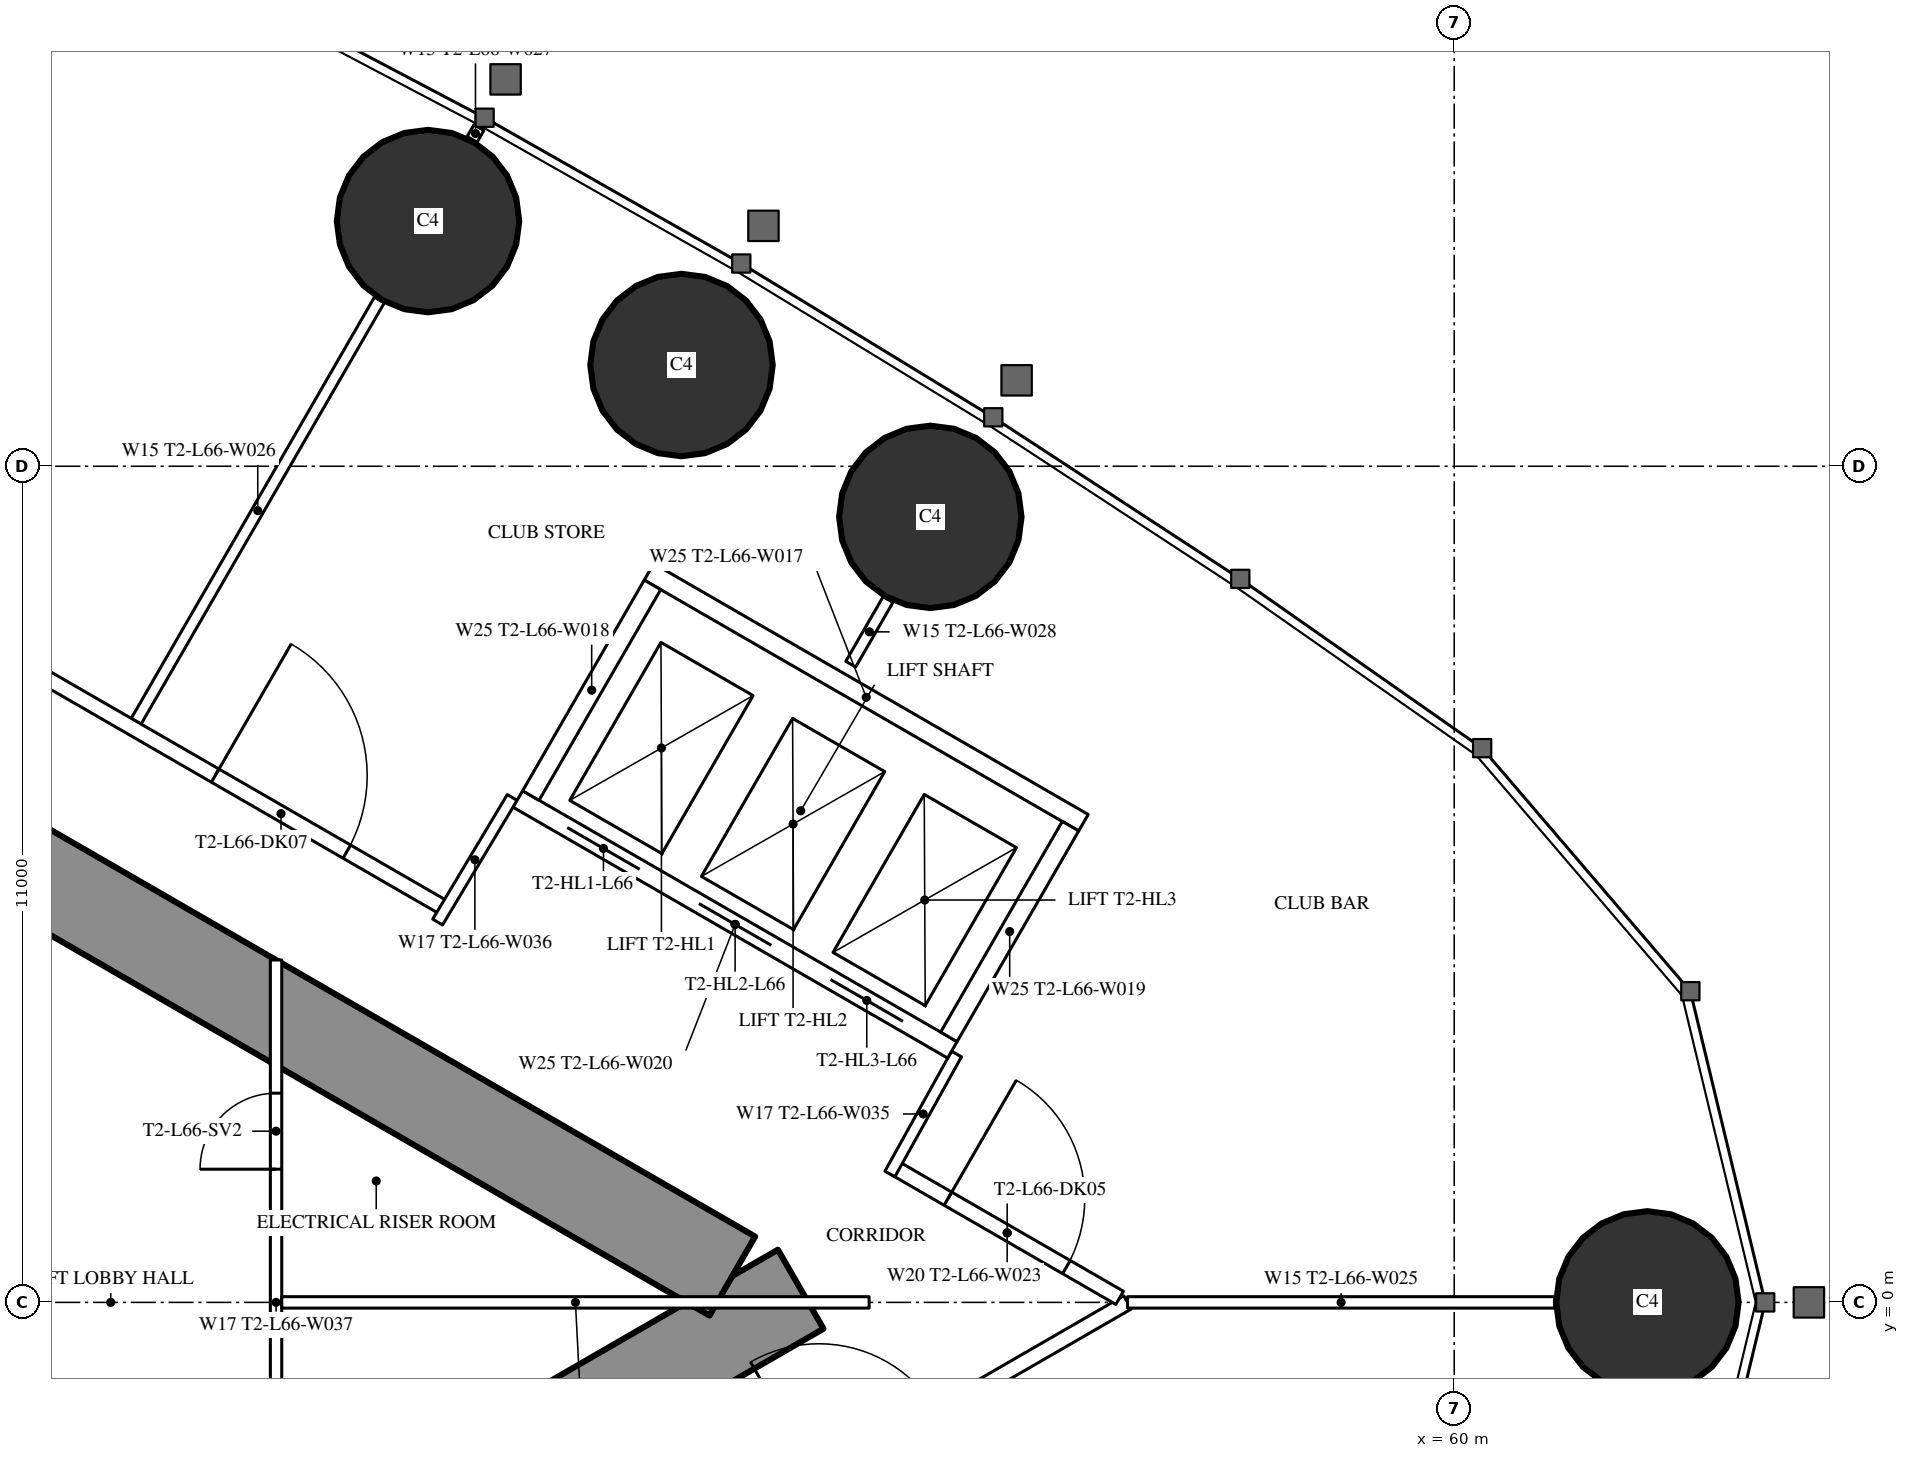
"""IFC4 building model, lengths in metres.
Left out: names, types, materials, properties, quantities, classifications, styles, units other than length and angle.
Written with IfcOpenShell. Run it as: python <this file> out.ifc"""

import sys

from ifc_helpers import new_model, si_unit, direction, frame, frame_2d, origin, origin_2d, place, context, subcontext, project, spatial, rectangle, circle, extrude, element, fill, save


model = new_model("IFC4")
c1 = context("Model", 3, precision=1e-05, world=origin(), true_north=direction((0.0, 1.0)))
c2 = subcontext(c1, "Body", "Model", "MODEL_VIEW")
j1 = project(units=[si_unit("LENGTHUNIT", "METRE"), si_unit("PLANEANGLEUNIT", "RADIAN")], contexts=[c1])
p1 = place(None, origin())
s1 = spatial("IfcSite", under=j1, at=p1, CompositionType="ELEMENT")
p2 = place(p1, origin())
s2 = spatial("IfcBuilding", under=s1, at=p2, CompositionType="ELEMENT")
p3 = place(p2, frame((0.0, 0.0, 247.7)))
s3 = spatial("IfcBuildingStorey", under=s2, at=p3, CompositionType="ELEMENT", Elevation=247.7)
for number, where, z_axis, x_axis in (
    (1, (62.542, 0.0, 0.0), (0.0, 0.0, 1.0), (1.0, 0.0, 0.0)),
    (2, (53.108, 10.334, 0.0), (0.0, 0.0, 1.0), (1.0, 0.0, 0.0)),
    (3, (49.834, 12.332, 0.0), (0.0, 0.0, 1.0), (1.0, 0.0, 0.0)),
    (4, (46.499, 14.226, 0.0), (0.0, 0.0, 1.0), (1.0, 0.0, 0.0)),
):
    element("IfcColumn", number, at=place(p3, frame(where, z_axis=z_axis, x_axis=x_axis)), inside=s3, PredefinedType="COLUMN", context=c2, shape_type="SweptSolid", body=[
        extrude(circle(Radius=1.2, at=origin_2d()), origin(), (0.0, 0.0, 1.0), 4.2),
    ])
p4 = place(p3, frame((27.2, -13.8, 0.0), z_axis=(0.0, 0.0, 1.0), x_axis=(0.866027159892, 0.499996958321, 0.0)))
e5 = element("IfcWall", 5, at=p4, inside=s3, PredefinedType="SHEAR", context=c2, shape_type="SweptSolid", body=[
    extrude(rectangle(XDim=27.947, YDim=1.2, at=frame_2d((13.973, 0.0))), origin(), (0.0, 0.0, 1.0), 4.2),
])
p5 = place(p4, frame((4.6, 0.0, 0.0)))
e6 = element("IfcOpeningElement", 6, at=p5, cuts=e5, PredefinedType="OPENING", context=c2, shape_type="SweptSolid", body=[
    extrude(rectangle(XDim=1.0, YDim=2.2, at=frame_2d((0.5, 1.1))), frame((0.0, 0.61, 0.0), z_axis=(0.0, -1.0, 0.0), x_axis=(1.0, 0.0, 0.0)), (0.0, 0.0, 1.0), 1.22),
])
p6 = place(p4, frame((13.395, 0.0, 0.0)))
e7 = element("IfcOpeningElement", 7, at=p6, cuts=e5, PredefinedType="OPENING", context=c2, shape_type="SweptSolid", body=[
    extrude(rectangle(XDim=1.8, YDim=2.2, at=frame_2d((0.9, 1.1))), frame((0.0, 0.61, 0.0), z_axis=(0.0, -1.0, 0.0), x_axis=(1.0, 0.0, 0.0)), (0.0, 0.0, 1.0), 1.22),
])
p7 = place(p3, frame((27.2, 13.8, 0.0), z_axis=(0.0, 0.0, 1.0), x_axis=(0.866024515034, -0.500001539357, 0.0)))
e8 = element("IfcWall", 8, at=p7, inside=s3, PredefinedType="SHEAR", context=c2, shape_type="SweptSolid", body=[
    extrude(rectangle(XDim=26.907, YDim=1.2, at=frame_2d((13.454, 0.0))), origin(), (0.0, 0.0, 1.0), 4.2),
])
p8 = place(p7, frame((4.6, 0.0, 0.0)))
e9 = element("IfcOpeningElement", 9, at=p8, cuts=e8, PredefinedType="OPENING", context=c2, shape_type="SweptSolid", body=[
    extrude(rectangle(XDim=1.0, YDim=2.2, at=frame_2d((0.5, 1.1))), frame((0.0, 0.61, 0.0), z_axis=(0.0, -1.0, 0.0), x_axis=(1.0, 0.0, 0.0)), (0.0, 0.0, 1.0), 1.22),
])
p9 = place(p7, frame((13.395, 0.0, 0.0)))
e10 = element("IfcOpeningElement", 10, at=p9, cuts=e8, PredefinedType="OPENING", context=c2, shape_type="SweptSolid", body=[
    extrude(rectangle(XDim=1.8, YDim=2.2, at=frame_2d((0.9, 1.1))), frame((0.0, 0.61, 0.0), z_axis=(0.0, -1.0, 0.0), x_axis=(1.0, 0.0, 0.0)), (0.0, 0.0, 1.0), 1.22),
])
p10 = place(p3, frame((28.907, -15.47, 0.0), z_axis=(0.0, 0.0, 1.0), x_axis=(0.866023700353, 0.500002950419, 0.0)))
e11 = element("IfcWall", 11, at=p10, inside=s3, PredefinedType="PARTITIONING", context=c2, shape_type="SweptSolid", body=[
    extrude(rectangle(XDim=30.941, YDim=0.2, at=frame_2d((15.47, 0.0))), origin(), (0.0, 0.0, 1.0), 3.95),
])
p11 = place(p10, frame((7.124, 0.0, 0.0)))
e12 = element("IfcOpeningElement", 12, at=p11, cuts=e11, PredefinedType="OPENING", context=c2, shape_type="SweptSolid", body=[
    extrude(rectangle(XDim=1.8, YDim=2.2, at=frame_2d((0.9, 1.1))), frame((0.0, 0.11, 0.0), z_axis=(0.0, -1.0, 0.0), x_axis=(1.0, 0.0, 0.0)), (0.0, 0.0, 1.0), 0.22),
])
p12 = place(p10, frame((16.865, 0.0, 0.0)))
e13 = element("IfcOpeningElement", 13, at=p12, cuts=e11, PredefinedType="OPENING", context=c2, shape_type="SweptSolid", body=[
    extrude(rectangle(XDim=1.8, YDim=2.2, at=frame_2d((0.9, 1.1))), frame((0.0, 0.11, 0.0), z_axis=(0.0, -1.0, 0.0), x_axis=(1.0, 0.0, 0.0)), (0.0, 0.0, 1.0), 0.22),
])
p13 = place(p10, frame((20.748, 0.0, 0.0)))
e14 = element("IfcOpeningElement", 14, at=p13, cuts=e11, PredefinedType="OPENING", context=c2, shape_type="SweptSolid", body=[
    extrude(rectangle(XDim=1.8, YDim=2.2, at=frame_2d((0.9, 1.1))), frame((0.0, 0.11, 0.0), z_axis=(0.0, -1.0, 0.0), x_axis=(1.0, 0.0, 0.0)), (0.0, 0.0, 1.0), 0.22),
])
p14 = place(p10, frame((26.252, 0.0, 0.0)))
e15 = element("IfcOpeningElement", 15, at=p14, cuts=e11, PredefinedType="OPENING", context=c2, shape_type="SweptSolid", body=[
    extrude(rectangle(XDim=1.8, YDim=2.2, at=frame_2d((0.9, 1.1))), frame((0.0, 0.11, 0.0), z_axis=(0.0, -1.0, 0.0), x_axis=(1.0, 0.0, 0.0)), (0.0, 0.0, 1.0), 0.22),
])
p15 = place(p3, frame((42.66, 7.646, 0.0), z_axis=(0.0, 0.0, 1.0), x_axis=(0.499996592859, 0.866027370889, 0.0)))
e16 = element("IfcWall", 16, at=p15, inside=s3, PredefinedType="PARTITIONING", context=c2, shape_type="SweptSolid", body=[
    extrude(rectangle(XDim=6.398, YDim=0.15, at=frame_2d((3.199, 0.0))), origin(), (0.0, 0.0, 1.0), 3.05),
])
p16 = place(p3, frame((47.079, 15.3, 0.0), z_axis=(0.0, 0.0, 1.0), x_axis=(0.499212083968, 0.866479829667, 0.0)))
e17 = element("IfcWall", 17, at=p16, inside=s3, PredefinedType="PARTITIONING", context=c2, shape_type="SweptSolid", body=[
    extrude(rectangle(XDim=0.179, YDim=0.15, at=frame_2d((0.09, 0.0))), origin(), (0.0, 0.0, 1.0), 3.05),
])
p17 = place(p3, frame((55.702, 0.0, 0.0), z_axis=(0.0, 0.0, 1.0), x_axis=(1.0, 0.0, 0.0)))
e18 = element("IfcWall", 18, at=p17, inside=s3, PredefinedType="PARTITIONING", context=c2, shape_type="SweptSolid", body=[
    extrude(rectangle(XDim=5.619, YDim=0.15, at=frame_2d((2.81, 0.0))), origin(), (0.0, 0.0, 1.0), 3.05),
])
p18 = place(p3, frame((52.06, 8.396, 0.0), z_axis=(0.0, 0.0, 1.0), x_axis=(0.500095379624, 0.865970329329, 0.0)))
e19 = element("IfcWall", 19, at=p18, inside=s3, PredefinedType="PARTITIONING", context=c2, shape_type="SweptSolid", body=[
    extrude(rectangle(XDim=0.982, YDim=0.15, at=frame_2d((0.491, 0.0))), origin(), (0.0, 0.0, 1.0), 3.95),
])
p19 = place(p3, frame((28.907, 15.47, 0.0), z_axis=(0.0, 0.0, 1.0), x_axis=(0.866026627509, -0.499997880441, 0.0)))
e20 = element("IfcWall", 20, at=p19, inside=s3, PredefinedType="PARTITIONING", context=c2, shape_type="SweptSolid", body=[
    extrude(rectangle(XDim=20.563, YDim=0.2, at=frame_2d((10.282, 0.0))), origin(), (0.0, 0.0, 1.0), 3.95),
])
p20 = place(p19, frame((17.081, 0.0, 0.0)))
e21 = element("IfcOpeningElement", 21, at=p20, cuts=e20, PredefinedType="OPENING", context=c2, shape_type="SweptSolid", body=[
    extrude(rectangle(XDim=2.0, YDim=2.4, at=frame_2d((1.0, 1.2))), frame((0.0, 0.11, 0.0), z_axis=(0.0, -1.0, 0.0), x_axis=(1.0, 0.0, 0.0)), (0.0, 0.0, 1.0), 0.22),
])
p21 = place(p19, frame((7.124, 0.0, 0.0)))
e22 = element("IfcOpeningElement", 22, at=p21, cuts=e20, PredefinedType="OPENING", context=c2, shape_type="SweptSolid", body=[
    extrude(rectangle(XDim=1.8, YDim=2.2, at=frame_2d((0.9, 1.1))), frame((0.0, 0.11, 0.0), z_axis=(0.0, -1.0, 0.0), x_axis=(1.0, 0.0, 0.0)), (0.0, 0.0, 1.0), 0.22),
])
p22 = place(p3, frame((52.639, 1.769, 0.0), z_axis=(0.0, 0.0, 1.0), x_axis=(0.866027340901, -0.4999966448, 0.0)))
e23 = element("IfcWall", 23, at=p22, inside=s3, PredefinedType="PARTITIONING", context=c2, shape_type="SweptSolid", body=[
    extrude(rectangle(XDim=3.417, YDim=0.2, at=frame_2d((1.708, 0.0))), origin(), (0.0, 0.0, 1.0), 3.95),
])
p23 = place(p22, frame((0.809, 0.0, 0.0)))
e24 = element("IfcOpeningElement", 24, at=p23, cuts=e23, PredefinedType="OPENING", context=c2, shape_type="SweptSolid", body=[
    extrude(rectangle(XDim=1.8, YDim=2.2, at=frame_2d((0.9, 1.1))), frame((0.0, 0.11, 0.0), z_axis=(0.0, -1.0, 0.0), x_axis=(1.0, 0.0, 0.0)), (0.0, 0.0, 1.0), 0.22),
])
p24 = place(p3, frame((47.606, 6.642, 0.0), z_axis=(0.0, 0.0, 1.0), x_axis=(-0.51353662755, -0.858067673418, 0.0)))
e25 = element("IfcWall", 25, at=p24, inside=s3, PredefinedType="PARTITIONING", context=c2, shape_type="SweptSolid", body=[
    extrude(rectangle(XDim=1.91, YDim=0.15, at=frame_2d((0.955, 0.0))), origin(), (0.0, 0.0, 1.0), 3.95),
])
p25 = place(p3, frame((52.576, 1.689, 0.0), z_axis=(0.0, 0.0, 1.0), x_axis=(0.485482130951, 0.874246590229, 0.0)))
e26 = element("IfcWall", 26, at=p25, inside=s3, PredefinedType="PARTITIONING", context=c2, shape_type="SweptSolid", body=[
    extrude(rectangle(XDim=1.805, YDim=0.15, at=frame_2d((0.902, 0.0))), origin(), (0.0, 0.0, 1.0), 3.95),
])
p26 = place(p3, frame((44.5, -4.505, 0.0), z_axis=(0.0, 0.0, 1.0), x_axis=(0.0, 1.0, 0.0)))
e27 = element("IfcWall", 27, at=p26, inside=s3, PredefinedType="PARTITIONING", context=c2, shape_type="SweptSolid", body=[
    extrude(rectangle(XDim=9.009, YDim=0.15, at=frame_2d((4.505, 0.0))), origin(), (0.0, 0.0, 1.0), 3.95),
])
p27 = place(p26, frame((1.752, 0.0, 0.0)))
e28 = element("IfcOpeningElement", 28, at=p27, cuts=e27, PredefinedType="OPENING", context=c2, shape_type="SweptSolid", body=[
    extrude(rectangle(XDim=1.0, YDim=2.2, at=frame_2d((0.5, 1.1))), frame((0.0, 0.085, 0.0), z_axis=(0.0, -1.0, 0.0), x_axis=(1.0, 0.0, 0.0)), (0.0, 0.0, 1.0), 0.17),
])
p28 = place(p26, frame((6.257, 0.0, 0.0)))
e29 = element("IfcOpeningElement", 29, at=p28, cuts=e27, PredefinedType="OPENING", context=c2, shape_type="SweptSolid", body=[
    extrude(rectangle(XDim=1.0, YDim=2.2, at=frame_2d((0.5, 1.1))), frame((0.0, 0.085, 0.0), z_axis=(0.0, -1.0, 0.0), x_axis=(1.0, 0.0, 0.0)), (0.0, 0.0, 1.0), 0.17),
])
p29 = place(p3, frame((44.575, 0.0, 0.0), z_axis=(0.0, 0.0, 1.0), x_axis=(1.0, 0.0, 0.0)))
e30 = element("IfcWall", 30, at=p29, inside=s3, PredefinedType="PARTITIONING", context=c2, shape_type="SweptSolid", body=[
    extrude(rectangle(XDim=7.727, YDim=0.15, at=frame_2d((3.864, 0.0))), origin(), (0.0, 0.0, 1.0), 3.05),
])
p30 = place(p3, frame((47.681, 6.622, 0.0), z_axis=(0.0, 0.0, 1.0), x_axis=(0.86603344179, -0.499986077507, 0.0)))
e31 = element("IfcWall", 31, at=p30, inside=s3, PredefinedType="PARTITIONING", context=c2, shape_type="SweptSolid", body=[
    extrude(rectangle(XDim=6.6, YDim=0.25, at=frame_2d((3.3, 0.0))), origin(), (0.0, 0.0, 1.0), 3.95),
])
p31 = place(p30, frame((0.75, 0.0, 0.0)))
e32 = element("IfcOpeningElement", 32, at=p31, cuts=e31, PredefinedType="OPENING", context=c2, shape_type="SweptSolid", body=[
    extrude(rectangle(XDim=1.1, YDim=2.2, at=frame_2d((0.55, 1.1))), frame((0.0, 0.135, 0.0), z_axis=(0.0, -1.0, 0.0), x_axis=(1.0, 0.0, 0.0)), (0.0, 0.0, 1.0), 0.27),
])
p32 = place(p30, frame((2.75, 0.0, 0.0)))
e33 = element("IfcOpeningElement", 33, at=p32, cuts=e31, PredefinedType="OPENING", context=c2, shape_type="SweptSolid", body=[
    extrude(rectangle(XDim=1.1, YDim=2.2, at=frame_2d((0.55, 1.1))), frame((0.0, 0.135, 0.0), z_axis=(0.0, -1.0, 0.0), x_axis=(1.0, 0.0, 0.0)), (0.0, 0.0, 1.0), 0.27),
])
p33 = place(p30, frame((4.75, 0.0, 0.0)))
e34 = element("IfcOpeningElement", 34, at=p33, cuts=e31, PredefinedType="OPENING", context=c2, shape_type="SweptSolid", body=[
    extrude(rectangle(XDim=1.1, YDim=2.2, at=frame_2d((0.55, 1.1))), frame((0.0, 0.135, 0.0), z_axis=(0.0, -1.0, 0.0), x_axis=(1.0, 0.0, 0.0)), (0.0, 0.0, 1.0), 0.27),
])
p34 = place(p3, frame((49.406, 9.611, 0.0), z_axis=(0.0, 0.0, 1.0), x_axis=(0.86603344179, -0.499986077507, 0.0)))
e35 = element("IfcWall", 35, at=p34, inside=s3, PredefinedType="PARTITIONING", context=c2, shape_type="SweptSolid", body=[
    extrude(rectangle(XDim=6.6, YDim=0.25, at=frame_2d((3.3, 0.0))), origin(), (0.0, 0.0, 1.0), 3.95),
])
p35 = place(p3, frame((47.852, 6.668, 0.0), z_axis=(0.0, 0.0, 1.0), x_axis=(0.499929347863, 0.866066190972, 0.0)))
e36 = element("IfcWall", 36, at=p35, inside=s3, PredefinedType="PARTITIONING", context=c2, shape_type="SweptSolid", body=[
    extrude(rectangle(XDim=3.201, YDim=0.25, at=frame_2d((1.6, 0.0))), origin(), (0.0, 0.0, 1.0), 3.95),
])
p36 = place(p3, frame((53.352, 3.493, 0.0), z_axis=(0.0, 0.0, 1.0), x_axis=(0.499872130319, 0.866099216793, 0.0)))
e37 = element("IfcWall", 37, at=p36, inside=s3, PredefinedType="PARTITIONING", context=c2, shape_type="SweptSolid", body=[
    extrude(rectangle(XDim=3.2, YDim=0.25, at=frame_2d((1.6, 0.0))), origin(), (0.0, 0.0, 1.0), 3.95),
])
p37 = place(p20, origin())
e38 = element("IfcDoor", 38, at=p37, inside=s3, OperationType="DOUBLE_DOOR_SINGLE_SWING", PredefinedType="DOOR", context=c2, shape_type="SweptSolid", body=[
    extrude(rectangle(XDim=2.0, YDim=2.4, at=frame_2d((1.0, 1.2))), frame((0.0, 0.025, 0.0), z_axis=(0.0, -1.0, 0.0), x_axis=(1.0, 0.0, 0.0)), (0.0, 0.0, 1.0), 0.05),
])
fill(e21, e38)
p38 = place(p23, origin())
e39 = element("IfcDoor", 39, at=p38, inside=s3, OperationType="DOUBLE_DOOR_SINGLE_SWING", PredefinedType="DOOR", context=c2, shape_type="SweptSolid", body=[
    extrude(rectangle(XDim=1.8, YDim=2.2, at=frame_2d((0.9, 1.1))), frame((0.0, 0.025, 0.0), z_axis=(0.0, -1.0, 0.0), x_axis=(1.0, 0.0, 0.0)), (0.0, 0.0, 1.0), 0.05),
])
fill(e24, e39)
p39 = place(p28, origin())
e40 = element("IfcDoor", 40, at=p39, inside=s3, OperationType="SINGLE_SWING_LEFT", PredefinedType="DOOR", context=c2, shape_type="SweptSolid", body=[
    extrude(rectangle(XDim=1.0, YDim=2.2, at=frame_2d((0.5, 1.1))), frame((0.0, 0.025, 0.0), z_axis=(0.0, -1.0, 0.0), x_axis=(1.0, 0.0, 0.0)), (0.0, 0.0, 1.0), 0.05),
])
fill(e29, e40)
p40 = place(p31, origin())
e41 = element("IfcDoor", 41, at=p40, inside=s3, OperationType="DOUBLE_DOOR_SLIDING", PredefinedType="USERDEFINED", context=c2, shape_type="SweptSolid", body=[
    extrude(rectangle(XDim=1.1, YDim=2.2, at=frame_2d((0.55, 1.1))), frame((0.0, 0.025, 0.0), z_axis=(0.0, -1.0, 0.0), x_axis=(1.0, 0.0, 0.0)), (0.0, 0.0, 1.0), 0.05),
])
fill(e32, e41)
p41 = place(p32, origin())
e42 = element("IfcDoor", 42, at=p41, inside=s3, OperationType="DOUBLE_DOOR_SLIDING", PredefinedType="USERDEFINED", context=c2, shape_type="SweptSolid", body=[
    extrude(rectangle(XDim=1.1, YDim=2.2, at=frame_2d((0.55, 1.1))), frame((0.0, 0.025, 0.0), z_axis=(0.0, -1.0, 0.0), x_axis=(1.0, 0.0, 0.0)), (0.0, 0.0, 1.0), 0.05),
])
fill(e33, e42)
p42 = place(p33, origin())
e43 = element("IfcDoor", 43, at=p42, inside=s3, OperationType="DOUBLE_DOOR_SLIDING", PredefinedType="USERDEFINED", context=c2, shape_type="SweptSolid", body=[
    extrude(rectangle(XDim=1.1, YDim=2.2, at=frame_2d((0.55, 1.1))), frame((0.0, 0.025, 0.0), z_axis=(0.0, -1.0, 0.0), x_axis=(1.0, 0.0, 0.0)), (0.0, 0.0, 1.0), 0.05),
])
fill(e34, e43)
save(model, sys.argv[1])
